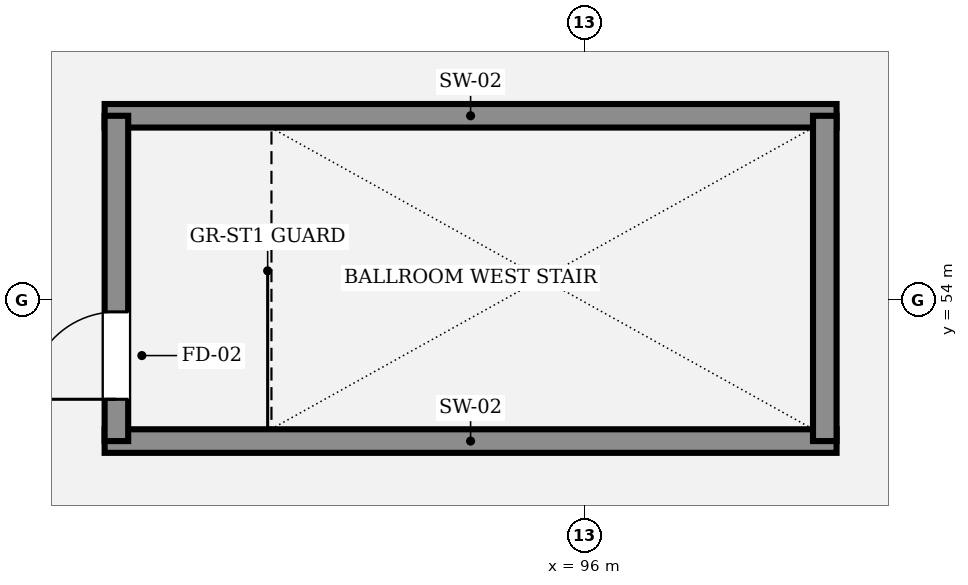
"""IFC4 building model, lengths in metres.
Left out: names, types, materials, properties, quantities, classifications, styles, units other than length and angle.
Written with IfcOpenShell. Run it as: python <this file> out.ifc"""

import sys

from ifc_helpers import new_model, si_unit, direction, frame, frame_2d, origin, place, context, subcontext, project, spatial, rectangle, extrude, element, fill, save


model = new_model("IFC4")
c1 = context("Model", 3, precision=1e-05, world=origin(), true_north=direction((0.0, 1.0)))
c2 = subcontext(c1, "Body", "Model", "MODEL_VIEW")
j1 = project(units=[si_unit("LENGTHUNIT", "METRE"), si_unit("PLANEANGLEUNIT", "RADIAN")], contexts=[c1])
p1 = place(None, origin())
s1 = spatial("IfcSite", under=j1, at=p1, CompositionType="ELEMENT")
p2 = place(p1, origin())
s2 = spatial("IfcBuilding", under=s1, at=p2, CompositionType="ELEMENT")
p3 = place(p2, frame((0.0, 0.0, 16.2)))
s3 = spatial("IfcBuildingStorey", under=s2, at=p3, CompositionType="ELEMENT", Elevation=16.2)
for number, where, z_axis, x_axis in (
    (1, (89.685, 52.14, 0.0), (0.0, 0.0, 1.0), (1.0, 0.0, 0.0)),
    (2, (89.685, 56.42, 0.0), (0.0, 0.0, 1.0), (1.0, 0.0, 0.0)),
):
    element("IfcWall", number, at=place(p3, frame(where, z_axis=z_axis, x_axis=x_axis)), inside=s3, PredefinedType="SHEAR", context=c2, shape_type="SweptSolid", body=[
        extrude(rectangle(XDim=9.63, YDim=0.31, at=frame_2d((4.815, 0.0))), origin(), (0.0, 0.0, 1.0), 4.8),
    ])
p4 = place(p3, frame((89.84, 52.14, 0.0), z_axis=(0.0, 0.0, 1.0), x_axis=(0.0, 1.0, 0.0)))
e3 = element("IfcWall", 3, at=p4, inside=s3, PredefinedType="SHEAR", context=c2, shape_type="SweptSolid", body=[
    extrude(rectangle(XDim=4.28, YDim=0.31, at=frame_2d((2.14, 0.0))), origin(), (0.0, 0.0, 1.0), 4.8),
])
p5 = place(p4, frame((0.55, 0.0, 0.0)))
e4 = element("IfcOpeningElement", 4, at=p5, cuts=e3, PredefinedType="OPENING", context=c2, shape_type="SweptSolid", body=[
    extrude(rectangle(XDim=1.15, YDim=2.2, at=frame_2d((0.575, 1.1))), frame((0.0, 0.165, 0.0), z_axis=(0.0, -1.0, 0.0), x_axis=(1.0, 0.0, 0.0)), (0.0, 0.0, 1.0), 0.33),
])
p6 = place(p3, frame((99.16, 52.14, 0.0), z_axis=(0.0, 0.0, 1.0), x_axis=(0.0, 1.0, 0.0)))
e5 = element("IfcWall", 5, at=p6, inside=s3, PredefinedType="SHEAR", context=c2, shape_type="SweptSolid", body=[
    extrude(rectangle(XDim=4.28, YDim=0.31, at=frame_2d((2.14, 0.0))), origin(), (0.0, 0.0, 1.0), 4.8),
])
p7 = place(p5, origin())
e6 = element("IfcDoor", 6, at=p7, inside=s3, OperationType="SINGLE_SWING_LEFT", PredefinedType="DOOR", context=c2, shape_type="SweptSolid", body=[
    extrude(rectangle(XDim=1.15, YDim=2.2, at=frame_2d((0.575, 1.1))), frame((0.0, 0.025, 0.0), z_axis=(0.0, -1.0, 0.0), x_axis=(1.0, 0.0, 0.0)), (0.0, 0.0, 1.0), 0.05),
])
fill(e4, e6)
save(model, sys.argv[1])
